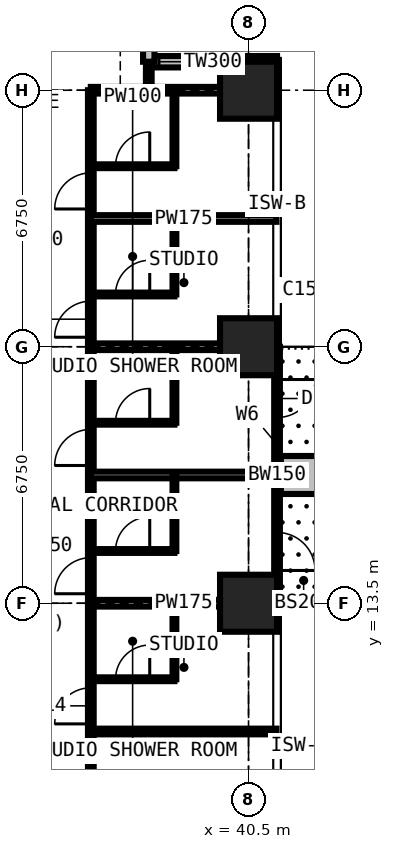
"""IFC4 building model, lengths in metres.
Left out: names, types, materials, properties, quantities, classifications, styles, units other than length and angle.
Written with IfcOpenShell. Run it as: python <this file> out.ifc"""

import sys

from ifc_helpers import new_model, si_unit, direction, frame, frame_2d, origin, origin_2d, place, context, subcontext, project, spatial, rectangle, extrude, element, fill, save


model = new_model("IFC4")
c1 = context("Model", 3, precision=1e-05, world=origin(), true_north=direction((0.0, 1.0)))
c2 = subcontext(c1, "Body", "Model", "MODEL_VIEW")
j1 = project(units=[si_unit("LENGTHUNIT", "METRE"), si_unit("PLANEANGLEUNIT", "RADIAN")], contexts=[c1])
p1 = place(None, origin())
s1 = spatial("IfcSite", under=j1, at=p1, CompositionType="ELEMENT")
p2 = place(p1, origin())
s2 = spatial("IfcBuilding", under=s1, at=p2, CompositionType="ELEMENT")
p3 = place(p2, frame((0.0, 0.0, 130.5)))
s3 = spatial("IfcBuildingStorey", under=s2, at=p3, CompositionType="ELEMENT", Elevation=130.5)
for number, where, z_axis, x_axis in (
    (1, (40.5, 13.5, 0.0), (0.0, 0.0, 1.0), (1.0, 0.0, 0.0)),
    (2, (40.5, 20.25, 0.0), (0.0, 0.0, 1.0), (1.0, 0.0, 0.0)),
    (3, (40.5, 27.0, 0.0), (0.0, 0.0, 1.0), (1.0, 0.0, 0.0)),
):
    element("IfcColumn", number, at=place(p3, frame(where, z_axis=z_axis, x_axis=x_axis)), inside=s3, PredefinedType="COLUMN", context=c2, shape_type="SweptSolid", body=[
        extrude(rectangle(XDim=1.5, YDim=1.5, at=origin_2d()), origin(), (0.0, 0.0, 1.0), 3.6),
    ])
p4 = place(p3, frame((41.25, 20.25, 0.0), z_axis=(0.0, 0.0, 1.0), x_axis=(0.0, -1.0, 0.0)))
e4 = element("IfcWall", 4, at=p4, inside=s3, PredefinedType="SOLIDWALL", context=c2, shape_type="SweptSolid", body=[
    extrude(rectangle(XDim=6.75, YDim=0.15, at=frame_2d((3.375, 0.0))), origin(), (0.0, 0.0, 1.0), 3.375),
])
p5 = place(p4, frame((0.863, 0.0, 0.0)))
e5 = element("IfcOpeningElement", 5, at=p5, cuts=e4, PredefinedType="OPENING", context=c2, shape_type="SweptSolid", body=[
    extrude(rectangle(XDim=1.0, YDim=2.2, at=frame_2d((0.5, 1.1))), frame((0.0, 0.085, 0.0), z_axis=(0.0, -1.0, 0.0), x_axis=(1.0, 0.0, 0.0)), (0.0, 0.0, 1.0), 0.17),
])
p6 = place(p4, frame((1.975, 0.0, 0.9)))
e6 = element("IfcOpeningElement", 6, at=p6, cuts=e4, PredefinedType="OPENING", context=c2, shape_type="SweptSolid", body=[
    extrude(rectangle(XDim=1.2, YDim=1.8, at=frame_2d((0.6, 0.9))), frame((0.0, 0.085, 0.0), z_axis=(0.0, -1.0, 0.0), x_axis=(1.0, 0.0, 0.0)), (0.0, 0.0, 1.0), 0.17),
])
p7 = place(p4, frame((4.887, 0.0, 0.0)))
e7 = element("IfcOpeningElement", 7, at=p7, cuts=e4, PredefinedType="OPENING", context=c2, shape_type="SweptSolid", body=[
    extrude(rectangle(XDim=1.0, YDim=2.2, at=frame_2d((0.5, 1.1))), frame((0.0, 0.085, 0.0), z_axis=(0.0, -1.0, 0.0), x_axis=(1.0, 0.0, 0.0)), (0.0, 0.0, 1.0), 0.17),
])
p8 = place(p4, frame((3.575, 0.0, 0.9)))
e8 = element("IfcOpeningElement", 8, at=p8, cuts=e4, PredefinedType="OPENING", context=c2, shape_type="SweptSolid", body=[
    extrude(rectangle(XDim=1.2, YDim=1.8, at=frame_2d((0.6, 0.9))), frame((0.0, 0.085, 0.0), z_axis=(0.0, -1.0, 0.0), x_axis=(1.0, 0.0, 0.0)), (0.0, 0.0, 1.0), 0.17),
])
p9 = place(p3, frame((41.25, 27.75, 0.0), z_axis=(0.0, 0.0, 1.0), x_axis=(-1.0, 0.0, 0.0)))
e9 = element("IfcWall", 9, at=p9, inside=s3, PredefinedType="SOLIDWALL", context=c2, shape_type="SweptSolid", body=[
    extrude(rectangle(XDim=3.375, YDim=0.3, at=frame_2d((1.688, 0.0))), origin(), (0.0, 0.0, 1.0), 3.375),
])
p10 = place(p9, frame((1.607, 0.0, 0.9)))
e10 = element("IfcOpeningElement", 10, at=p10, cuts=e9, PredefinedType="OPENING", context=c2, shape_type="SweptSolid", body=[
    extrude(rectangle(XDim=1.5, YDim=1.8, at=frame_2d((0.75, 0.9))), frame((0.0, 0.16, 0.0), z_axis=(0.0, -1.0, 0.0), x_axis=(1.0, 0.0, 0.0)), (0.0, 0.0, 1.0), 0.32),
])
p11 = place(p3, frame((37.875, 27.75, 0.0), z_axis=(0.0, 0.0, 1.0), x_axis=(0.0, 1.0, 0.0)))
e11 = element("IfcWall", 11, at=p11, inside=s3, PredefinedType="SOLIDWALL", context=c2, shape_type="SweptSolid", body=[
    extrude(rectangle(XDim=3.375, YDim=0.3, at=frame_2d((1.688, 0.0))), origin(), (0.0, 0.0, 1.0), 3.375),
])
p12 = place(p11, frame((0.788, 0.0, 0.6)))
e12 = element("IfcOpeningElement", 12, at=p12, cuts=e11, PredefinedType="OPENING", context=c2, shape_type="SweptSolid", body=[
    extrude(rectangle(XDim=1.8, YDim=2.1, at=frame_2d((0.9, 1.05))), frame((0.0, 0.16, 0.0), z_axis=(0.0, -1.0, 0.0), x_axis=(1.0, 0.0, 0.0)), (0.0, 0.0, 1.0), 0.32),
])
p13 = place(p3, frame((41.35, 16.875, 0.0), z_axis=(0.0, 0.0, 1.0), x_axis=(1.0, 0.0, 0.0)))
e13 = element("IfcWall", 13, at=p13, inside=s3, PredefinedType="USERDEFINED", context=c2, shape_type="SweptSolid", body=[
    extrude(rectangle(XDim=2.2, YDim=1.0, at=frame_2d((1.1, 0.0))), origin(), (0.0, 0.0, 1.0), 0.9),
])
p14 = place(p3, frame((36.35, 6.75, 0.0), z_axis=(0.0, 0.0, 1.0), x_axis=(0.0, 1.0, 0.0)))
e14 = element("IfcWall", 14, at=p14, inside=s3, PredefinedType="PARTITIONING", context=c2, shape_type="SweptSolid", body=[
    extrude(rectangle(XDim=20.25, YDim=0.15, at=frame_2d((10.125, 0.0))), origin(), (0.0, 0.0, 1.0), 3.375),
])
p15 = place(p14, frame((3.575, 0.0, 0.0)))
e15 = element("IfcOpeningElement", 15, at=p15, cuts=e14, PredefinedType="OPENING", context=c2, shape_type="SweptSolid", body=[
    extrude(rectangle(XDim=0.95, YDim=2.2, at=frame_2d((0.475, 1.1))), frame((0.0, 0.085, 0.0), z_axis=(0.0, -1.0, 0.0), x_axis=(1.0, 0.0, 0.0)), (0.0, 0.0, 1.0), 0.17),
])
p16 = place(p14, frame((7.0, 0.0, 0.0)))
e16 = element("IfcOpeningElement", 16, at=p16, cuts=e14, PredefinedType="OPENING", context=c2, shape_type="SweptSolid", body=[
    extrude(rectangle(XDim=0.95, YDim=2.2, at=frame_2d((0.475, 1.1))), frame((0.0, 0.085, 0.0), z_axis=(0.0, -1.0, 0.0), x_axis=(1.0, 0.0, 0.0)), (0.0, 0.0, 1.0), 0.17),
])
p17 = place(p14, frame((10.375, 0.0, 0.0)))
e17 = element("IfcOpeningElement", 17, at=p17, cuts=e14, PredefinedType="OPENING", context=c2, shape_type="SweptSolid", body=[
    extrude(rectangle(XDim=0.95, YDim=2.2, at=frame_2d((0.475, 1.1))), frame((0.0, 0.085, 0.0), z_axis=(0.0, -1.0, 0.0), x_axis=(1.0, 0.0, 0.0)), (0.0, 0.0, 1.0), 0.17),
])
p18 = place(p14, frame((13.75, 0.0, 0.0)))
e18 = element("IfcOpeningElement", 18, at=p18, cuts=e14, PredefinedType="OPENING", context=c2, shape_type="SweptSolid", body=[
    extrude(rectangle(XDim=0.95, YDim=2.2, at=frame_2d((0.475, 1.1))), frame((0.0, 0.085, 0.0), z_axis=(0.0, -1.0, 0.0), x_axis=(1.0, 0.0, 0.0)), (0.0, 0.0, 1.0), 0.17),
])
p19 = place(p14, frame((17.125, 0.0, 0.0)))
e19 = element("IfcOpeningElement", 19, at=p19, cuts=e14, PredefinedType="OPENING", context=c2, shape_type="SweptSolid", body=[
    extrude(rectangle(XDim=0.95, YDim=2.2, at=frame_2d((0.475, 1.1))), frame((0.0, 0.085, 0.0), z_axis=(0.0, -1.0, 0.0), x_axis=(1.0, 0.0, 0.0)), (0.0, 0.0, 1.0), 0.17),
])
p20 = place(p3, frame((36.35, 10.125, 0.0), z_axis=(0.0, 0.0, 1.0), x_axis=(1.0, 0.0, 0.0)))
e20 = element("IfcWall", 20, at=p20, inside=s3, PredefinedType="PARTITIONING", context=c2, shape_type="SweptSolid", body=[
    extrude(rectangle(XDim=4.884, YDim=0.15, at=frame_2d((2.442, 0.0))), origin(), (0.0, 0.0, 1.0), 3.375),
])
p21 = place(p3, frame((36.35, 11.5, 0.0), z_axis=(0.0, 0.0, 1.0), x_axis=(1.0, 0.0, 0.0)))
e21 = element("IfcWall", 21, at=p21, inside=s3, PredefinedType="PARTITIONING", context=c2, shape_type="SweptSolid", body=[
    extrude(rectangle(XDim=2.2, YDim=0.1, at=frame_2d((1.1, 0.0))), origin(), (0.0, 0.0, 1.0), 3.375),
])
p22 = place(p21, frame((0.65, 0.0, 0.0)))
e22 = element("IfcOpeningElement", 22, at=p22, cuts=e21, PredefinedType="OPENING", context=c2, shape_type="SweptSolid", body=[
    extrude(rectangle(XDim=0.9, YDim=2.2, at=frame_2d((0.45, 1.1))), frame((0.0, 0.06, 0.0), z_axis=(0.0, -1.0, 0.0), x_axis=(1.0, 0.0, 0.0)), (0.0, 0.0, 1.0), 0.12),
])
p23 = place(p3, frame((36.35, 13.5, 0.0), z_axis=(0.0, 0.0, 1.0), x_axis=(1.0, 0.0, 0.0)))
e23 = element("IfcWall", 23, at=p23, inside=s3, PredefinedType="PARTITIONING", context=c2, shape_type="SweptSolid", body=[
    extrude(rectangle(XDim=4.884, YDim=0.175, at=frame_2d((2.442, 0.0))), origin(), (0.0, 0.0, 1.0), 2.877),
])
p24 = place(p3, frame((36.35, 14.875, 0.0), z_axis=(0.0, 0.0, 1.0), x_axis=(1.0, 0.0, 0.0)))
e24 = element("IfcWall", 24, at=p24, inside=s3, PredefinedType="PARTITIONING", context=c2, shape_type="SweptSolid", body=[
    extrude(rectangle(XDim=2.2, YDim=0.1, at=frame_2d((1.1, 0.0))), origin(), (0.0, 0.0, 1.0), 3.375),
])
p25 = place(p24, frame((0.65, 0.0, 0.0)))
e25 = element("IfcOpeningElement", 25, at=p25, cuts=e24, PredefinedType="OPENING", context=c2, shape_type="SweptSolid", body=[
    extrude(rectangle(XDim=0.9, YDim=2.2, at=frame_2d((0.45, 1.1))), frame((0.0, 0.06, 0.0), z_axis=(0.0, -1.0, 0.0), x_axis=(1.0, 0.0, 0.0)), (0.0, 0.0, 1.0), 0.12),
])
p26 = place(p3, frame((36.35, 16.875, 0.0), z_axis=(0.0, 0.0, 1.0), x_axis=(1.0, 0.0, 0.0)))
e26 = element("IfcWall", 26, at=p26, inside=s3, PredefinedType="PARTITIONING", context=c2, shape_type="SweptSolid", body=[
    extrude(rectangle(XDim=4.884, YDim=0.175, at=frame_2d((2.442, 0.0))), origin(), (0.0, 0.0, 1.0), 3.375),
])
p27 = place(p3, frame((36.35, 18.25, 0.0), z_axis=(0.0, 0.0, 1.0), x_axis=(1.0, 0.0, 0.0)))
e27 = element("IfcWall", 27, at=p27, inside=s3, PredefinedType="PARTITIONING", context=c2, shape_type="SweptSolid", body=[
    extrude(rectangle(XDim=2.2, YDim=0.1, at=frame_2d((1.1, 0.0))), origin(), (0.0, 0.0, 1.0), 3.375),
])
p28 = place(p27, frame((0.65, 0.0, 0.0)))
e28 = element("IfcOpeningElement", 28, at=p28, cuts=e27, PredefinedType="OPENING", context=c2, shape_type="SweptSolid", body=[
    extrude(rectangle(XDim=0.9, YDim=2.2, at=frame_2d((0.45, 1.1))), frame((0.0, 0.06, 0.0), z_axis=(0.0, -1.0, 0.0), x_axis=(1.0, 0.0, 0.0)), (0.0, 0.0, 1.0), 0.12),
])
p29 = place(p3, frame((36.35, 20.25, 0.0), z_axis=(0.0, 0.0, 1.0), x_axis=(1.0, 0.0, 0.0)))
e29 = element("IfcWall", 29, at=p29, inside=s3, PredefinedType="PARTITIONING", context=c2, shape_type="SweptSolid", body=[
    extrude(rectangle(XDim=4.884, YDim=0.175, at=frame_2d((2.442, 0.0))), origin(), (0.0, 0.0, 1.0), 2.877),
])
p30 = place(p3, frame((36.35, 21.625, 0.0), z_axis=(0.0, 0.0, 1.0), x_axis=(1.0, 0.0, 0.0)))
e30 = element("IfcWall", 30, at=p30, inside=s3, PredefinedType="PARTITIONING", context=c2, shape_type="SweptSolid", body=[
    extrude(rectangle(XDim=2.2, YDim=0.1, at=frame_2d((1.1, 0.0))), origin(), (0.0, 0.0, 1.0), 3.375),
])
p31 = place(p30, frame((0.65, 0.0, 0.0)))
e31 = element("IfcOpeningElement", 31, at=p31, cuts=e30, PredefinedType="OPENING", context=c2, shape_type="SweptSolid", body=[
    extrude(rectangle(XDim=0.9, YDim=2.2, at=frame_2d((0.45, 1.1))), frame((0.0, 0.06, 0.0), z_axis=(0.0, -1.0, 0.0), x_axis=(1.0, 0.0, 0.0)), (0.0, 0.0, 1.0), 0.12),
])
p32 = place(p3, frame((36.35, 23.625, 0.0), z_axis=(0.0, 0.0, 1.0), x_axis=(1.0, 0.0, 0.0)))
e32 = element("IfcWall", 32, at=p32, inside=s3, PredefinedType="PARTITIONING", context=c2, shape_type="SweptSolid", body=[
    extrude(rectangle(XDim=4.884, YDim=0.175, at=frame_2d((2.442, 0.0))), origin(), (0.0, 0.0, 1.0), 3.375),
])
p33 = place(p3, frame((36.35, 25.0, 0.0), z_axis=(0.0, 0.0, 1.0), x_axis=(1.0, 0.0, 0.0)))
e33 = element("IfcWall", 33, at=p33, inside=s3, PredefinedType="PARTITIONING", context=c2, shape_type="SweptSolid", body=[
    extrude(rectangle(XDim=2.2, YDim=0.1, at=frame_2d((1.1, 0.0))), origin(), (0.0, 0.0, 1.0), 3.375),
])
p34 = place(p33, frame((0.65, 0.0, 0.0)))
e34 = element("IfcOpeningElement", 34, at=p34, cuts=e33, PredefinedType="OPENING", context=c2, shape_type="SweptSolid", body=[
    extrude(rectangle(XDim=0.9, YDim=2.2, at=frame_2d((0.45, 1.1))), frame((0.0, 0.06, 0.0), z_axis=(0.0, -1.0, 0.0), x_axis=(1.0, 0.0, 0.0)), (0.0, 0.0, 1.0), 0.12),
])
p35 = place(p3, frame((36.35, 27.0, 0.0), z_axis=(0.0, 0.0, 1.0), x_axis=(1.0, 0.0, 0.0)))
e35 = element("IfcWall", 35, at=p35, inside=s3, PredefinedType="PARTITIONING", context=c2, shape_type="SweptSolid", body=[
    extrude(rectangle(XDim=4.884, YDim=0.175, at=frame_2d((2.442, 0.0))), origin(), (0.0, 0.0, 1.0), 2.877),
])
p36 = place(p3, frame((37.875, 27.0, 0.0), z_axis=(0.0, 0.0, 1.0), x_axis=(0.0, 1.0, 0.0)))
e36 = element("IfcWall", 36, at=p36, inside=s3, PredefinedType="PARTITIONING", context=c2, shape_type="SweptSolid", body=[
    extrude(rectangle(XDim=0.734, YDim=0.15, at=frame_2d((0.367, 0.0))), origin(), (0.0, 0.0, 1.0), 3.375),
])
for number, where, z_axis, x_axis in (
    (37, (38.55, 11.5, 0.0), (0.0, 0.0, 1.0), (0.0, 1.0, 0.0)),
    (38, (38.55, 14.875, 0.0), (0.0, 0.0, 1.0), (0.0, 1.0, 0.0)),
    (39, (38.55, 18.25, 0.0), (0.0, 0.0, 1.0), (0.0, 1.0, 0.0)),
    (40, (38.55, 21.625, 0.0), (0.0, 0.0, 1.0), (0.0, 1.0, 0.0)),
    (41, (38.55, 25.0, 0.0), (0.0, 0.0, 1.0), (0.0, 1.0, 0.0)),
):
    element("IfcWall", number, at=place(p3, frame(where, z_axis=z_axis, x_axis=x_axis)), inside=s3, PredefinedType="PARTITIONING", context=c2, shape_type="SweptSolid", body=[
        extrude(rectangle(XDim=2.0, YDim=0.1, at=frame_2d((1.0, 0.0))), origin(), (0.0, 0.0, 1.0), 3.375),
    ])
p37 = place(p5, origin())
e42 = element("IfcDoor", 42, at=p37, inside=s3, OperationType="SINGLE_SWING_LEFT", PredefinedType="DOOR", context=c2, shape_type="SweptSolid", body=[
    extrude(rectangle(XDim=1.0, YDim=2.2, at=frame_2d((0.5, 1.1))), frame((0.0, 0.025, 0.0), z_axis=(0.0, -1.0, 0.0), x_axis=(1.0, 0.0, 0.0)), (0.0, 0.0, 1.0), 0.05),
])
fill(e5, e42)
p38 = place(p6, origin())
e43 = element("IfcWindow", 43, at=p38, inside=s3, PartitioningType="SINGLE_PANEL", PredefinedType="WINDOW", context=c2, shape_type="SweptSolid", body=[
    extrude(rectangle(XDim=1.2, YDim=1.8, at=frame_2d((0.6, 0.9))), frame((0.0, 0.03, 0.0), z_axis=(0.0, -1.0, 0.0), x_axis=(1.0, 0.0, 0.0)), (0.0, 0.0, 1.0), 0.06),
])
fill(e6, e43)
p39 = place(p7, origin())
e44 = element("IfcDoor", 44, at=p39, inside=s3, OperationType="SINGLE_SWING_RIGHT", PredefinedType="DOOR", context=c2, shape_type="SweptSolid", body=[
    extrude(rectangle(XDim=1.0, YDim=2.2, at=frame_2d((0.5, 1.1))), frame((0.0, 0.025, 0.0), z_axis=(0.0, -1.0, 0.0), x_axis=(1.0, 0.0, 0.0)), (0.0, 0.0, 1.0), 0.05),
])
fill(e7, e44)
p40 = place(p8, origin())
e45 = element("IfcWindow", 45, at=p40, inside=s3, PartitioningType="SINGLE_PANEL", PredefinedType="WINDOW", context=c2, shape_type="SweptSolid", body=[
    extrude(rectangle(XDim=1.2, YDim=1.8, at=frame_2d((0.6, 0.9))), frame((0.0, 0.03, 0.0), z_axis=(0.0, -1.0, 0.0), x_axis=(1.0, 0.0, 0.0)), (0.0, 0.0, 1.0), 0.06),
])
fill(e8, e45)
p41 = place(p10, origin())
e46 = element("IfcWindow", 46, at=p41, inside=s3, PartitioningType="SINGLE_PANEL", PredefinedType="WINDOW", context=c2, shape_type="SweptSolid", body=[
    extrude(rectangle(XDim=1.5, YDim=1.8, at=frame_2d((0.75, 0.9))), frame((0.0, 0.03, 0.0), z_axis=(0.0, -1.0, 0.0), x_axis=(1.0, 0.0, 0.0)), (0.0, 0.0, 1.0), 0.06),
])
fill(e10, e46)
p42 = place(p15, origin())
e47 = element("IfcDoor", 47, at=p42, inside=s3, OperationType="SINGLE_SWING_LEFT", PredefinedType="DOOR", context=c2, shape_type="SweptSolid", body=[
    extrude(rectangle(XDim=0.95, YDim=2.2, at=frame_2d((0.475, 1.1))), frame((0.0, 0.025, 0.0), z_axis=(0.0, -1.0, 0.0), x_axis=(1.0, 0.0, 0.0)), (0.0, 0.0, 1.0), 0.05),
])
fill(e15, e47)
p43 = place(p22, origin())
e48 = element("IfcDoor", 48, at=p43, inside=s3, OperationType="SINGLE_SWING_RIGHT", PredefinedType="DOOR", context=c2, shape_type="SweptSolid", body=[
    extrude(rectangle(XDim=0.9, YDim=2.2, at=frame_2d((0.45, 1.1))), frame((0.0, 0.025, 0.0), z_axis=(0.0, -1.0, 0.0), x_axis=(1.0, 0.0, 0.0)), (0.0, 0.0, 1.0), 0.05),
])
fill(e22, e48)
p44 = place(p16, origin())
e49 = element("IfcDoor", 49, at=p44, inside=s3, OperationType="SINGLE_SWING_LEFT", PredefinedType="DOOR", context=c2, shape_type="SweptSolid", body=[
    extrude(rectangle(XDim=0.95, YDim=2.2, at=frame_2d((0.475, 1.1))), frame((0.0, 0.025, 0.0), z_axis=(0.0, -1.0, 0.0), x_axis=(1.0, 0.0, 0.0)), (0.0, 0.0, 1.0), 0.05),
])
fill(e16, e49)
p45 = place(p25, origin())
e50 = element("IfcDoor", 50, at=p45, inside=s3, OperationType="SINGLE_SWING_RIGHT", PredefinedType="DOOR", context=c2, shape_type="SweptSolid", body=[
    extrude(rectangle(XDim=0.9, YDim=2.2, at=frame_2d((0.45, 1.1))), frame((0.0, 0.025, 0.0), z_axis=(0.0, -1.0, 0.0), x_axis=(1.0, 0.0, 0.0)), (0.0, 0.0, 1.0), 0.05),
])
fill(e25, e50)
p46 = place(p17, origin())
e51 = element("IfcDoor", 51, at=p46, inside=s3, OperationType="SINGLE_SWING_LEFT", PredefinedType="DOOR", context=c2, shape_type="SweptSolid", body=[
    extrude(rectangle(XDim=0.95, YDim=2.2, at=frame_2d((0.475, 1.1))), frame((0.0, 0.025, 0.0), z_axis=(0.0, -1.0, 0.0), x_axis=(1.0, 0.0, 0.0)), (0.0, 0.0, 1.0), 0.05),
])
fill(e17, e51)
p47 = place(p28, origin())
e52 = element("IfcDoor", 52, at=p47, inside=s3, OperationType="SINGLE_SWING_RIGHT", PredefinedType="DOOR", context=c2, shape_type="SweptSolid", body=[
    extrude(rectangle(XDim=0.9, YDim=2.2, at=frame_2d((0.45, 1.1))), frame((0.0, 0.025, 0.0), z_axis=(0.0, -1.0, 0.0), x_axis=(1.0, 0.0, 0.0)), (0.0, 0.0, 1.0), 0.05),
])
fill(e28, e52)
p48 = place(p18, origin())
e53 = element("IfcDoor", 53, at=p48, inside=s3, OperationType="SINGLE_SWING_LEFT", PredefinedType="DOOR", context=c2, shape_type="SweptSolid", body=[
    extrude(rectangle(XDim=0.95, YDim=2.2, at=frame_2d((0.475, 1.1))), frame((0.0, 0.025, 0.0), z_axis=(0.0, -1.0, 0.0), x_axis=(1.0, 0.0, 0.0)), (0.0, 0.0, 1.0), 0.05),
])
fill(e18, e53)
p49 = place(p31, origin())
e54 = element("IfcDoor", 54, at=p49, inside=s3, OperationType="SINGLE_SWING_RIGHT", PredefinedType="DOOR", context=c2, shape_type="SweptSolid", body=[
    extrude(rectangle(XDim=0.9, YDim=2.2, at=frame_2d((0.45, 1.1))), frame((0.0, 0.025, 0.0), z_axis=(0.0, -1.0, 0.0), x_axis=(1.0, 0.0, 0.0)), (0.0, 0.0, 1.0), 0.05),
])
fill(e31, e54)
p50 = place(p19, origin())
e55 = element("IfcDoor", 55, at=p50, inside=s3, OperationType="SINGLE_SWING_LEFT", PredefinedType="DOOR", context=c2, shape_type="SweptSolid", body=[
    extrude(rectangle(XDim=0.95, YDim=2.2, at=frame_2d((0.475, 1.1))), frame((0.0, 0.025, 0.0), z_axis=(0.0, -1.0, 0.0), x_axis=(1.0, 0.0, 0.0)), (0.0, 0.0, 1.0), 0.05),
])
fill(e19, e55)
p51 = place(p34, origin())
e56 = element("IfcDoor", 56, at=p51, inside=s3, OperationType="SINGLE_SWING_RIGHT", PredefinedType="DOOR", context=c2, shape_type="SweptSolid", body=[
    extrude(rectangle(XDim=0.9, YDim=2.2, at=frame_2d((0.45, 1.1))), frame((0.0, 0.025, 0.0), z_axis=(0.0, -1.0, 0.0), x_axis=(1.0, 0.0, 0.0)), (0.0, 0.0, 1.0), 0.05),
])
fill(e34, e56)
save(model, sys.argv[1])
